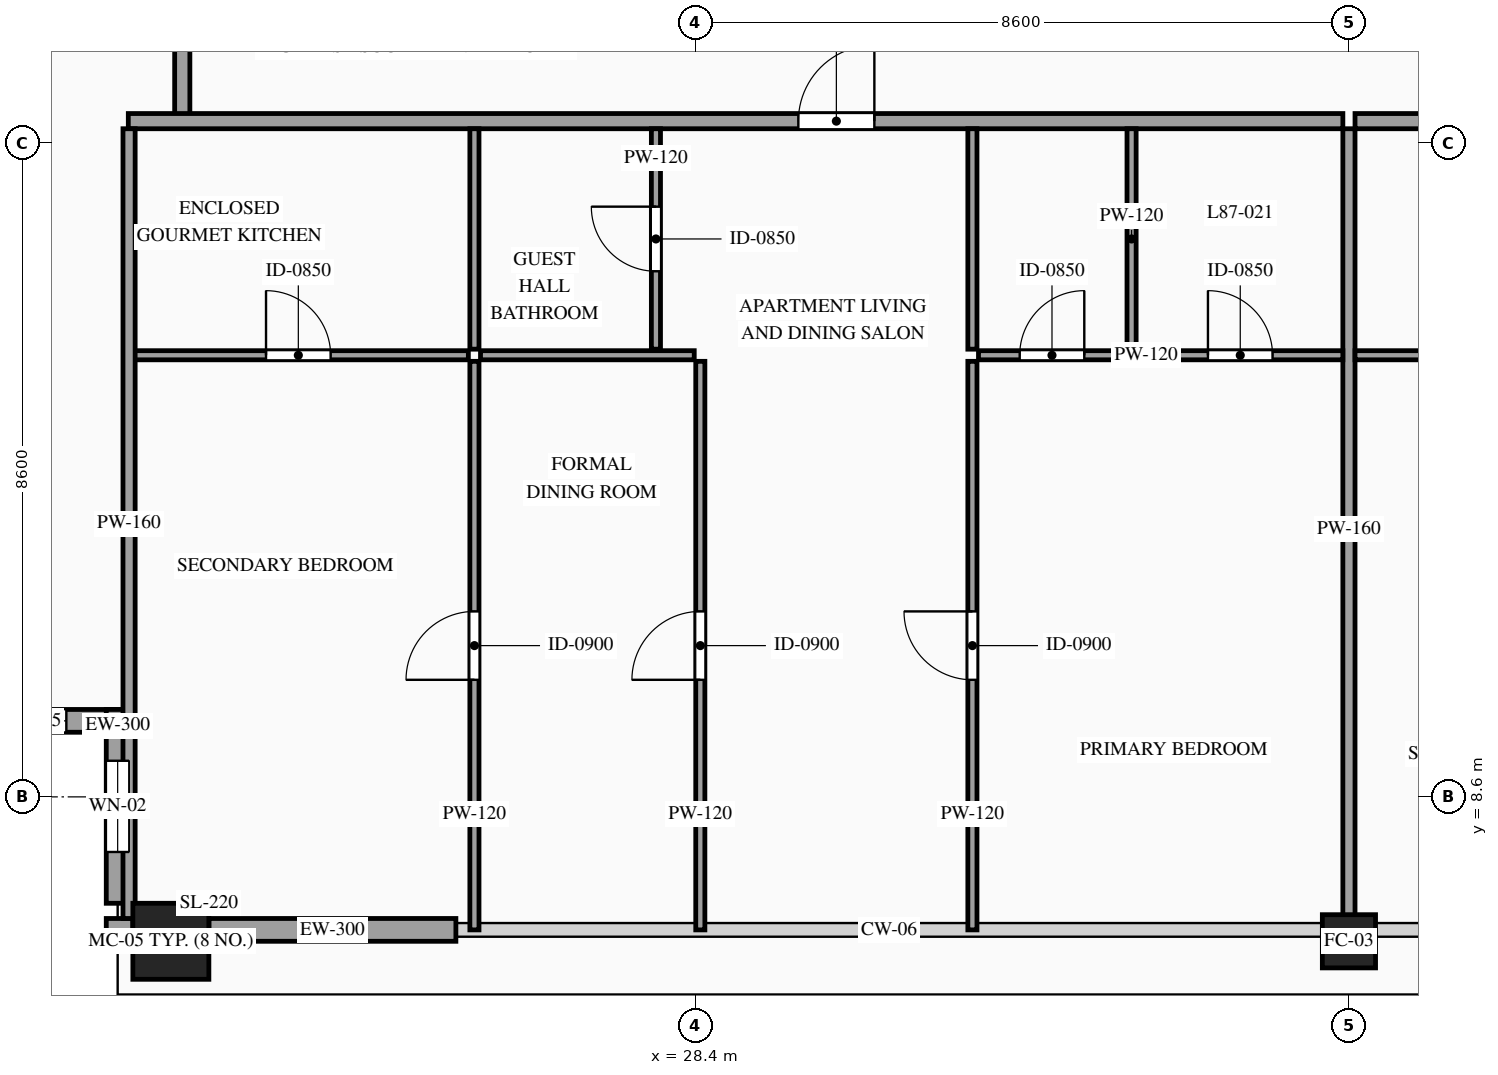
"""IFC4 building model, lengths in metres.
Left out: names, types, materials, properties, quantities, classifications, styles, units other than length and angle.
Written with IfcOpenShell. Run it as: python <this file> out.ifc"""

import sys

from ifc_helpers import new_model, si_unit, direction, frame, frame_2d, origin, origin_2d, place, context, subcontext, project, spatial, rectangle, hollow_rectangle, extrude, source, transform, mapped, element, fill, save


model = new_model("IFC4")
c1 = context("Model", 3, precision=1e-05, world=origin(), true_north=direction((0.0, 1.0)))
c2 = subcontext(c1, "Body", "Model", "MODEL_VIEW")
j1 = project(units=[si_unit("LENGTHUNIT", "METRE"), si_unit("PLANEANGLEUNIT", "RADIAN")], contexts=[c1])
p1 = place(None, origin())
s1 = spatial("IfcSite", under=j1, at=p1, CompositionType="ELEMENT")
p2 = place(p1, origin())
s2 = spatial("IfcBuilding", under=s1, at=p2, CompositionType="ELEMENT")
p3 = place(p2, frame((0.0, 0.0, 325.2)))
s3 = spatial("IfcBuildingStorey", under=s2, at=p3, CompositionType="ELEMENT", Elevation=325.2)
m1 = source(origin(), c2, "Body", "SweptSolid", [
    extrude(hollow_rectangle(XDim=1.0, YDim=1.0, WallThickness=0.048, at=origin_2d()), origin(), (0.0, 0.0, 1.0), 3.5),
])
p4 = place(p3, frame((21.5, 6.7, 0.0), z_axis=(0.0, 0.0, 1.0), x_axis=(1.0, 0.0, 0.0)))
e1 = element("IfcColumn", 1, at=p4, inside=s3, PredefinedType="COLUMN", context=c2, shape_type="MappedRepresentation", body=[
    mapped(m1, transform((0.0, 0.0, 0.0), scale=1.0)),
])
m2 = source(origin(), c2, "Body", "SweptSolid", [
    extrude(hollow_rectangle(XDim=0.7, YDim=0.7, WallThickness=0.032, at=origin_2d()), origin(), (0.0, 0.0, 1.0), 3.5),
])
p5 = place(p3, frame((37.0, 6.7, 0.0), z_axis=(0.0, 0.0, 1.0), x_axis=(1.0, 0.0, 0.0)))
e2 = element("IfcColumn", 2, at=p5, inside=s3, PredefinedType="COLUMN", context=c2, shape_type="MappedRepresentation", body=[
    mapped(m2, transform((0.0, 0.0, 0.0), scale=1.0)),
])
p6 = place(p3, frame((18.4, 9.6, 0.0), z_axis=(0.0, 0.0, 1.0), x_axis=(1.0, 0.0, 0.0)))
e3 = element("IfcWall", 3, at=p6, inside=s3, PredefinedType="SOLIDWALL", context=c2, shape_type="SweptSolid", body=[
    extrude(rectangle(XDim=2.55, YDim=0.3, at=frame_2d((1.275, 0.0))), origin(), (0.0, 0.0, 1.0), 3.28),
])
p7 = place(p6, frame((0.825, 0.0, 0.85)))
e4 = element("IfcOpeningElement", 4, at=p7, cuts=e3, PredefinedType="OPENING", context=c2, shape_type="SweptSolid", body=[
    extrude(rectangle(XDim=0.9, YDim=1.5, at=frame_2d((0.45, 0.75))), frame((0.0, 0.165, 0.0), z_axis=(0.0, -1.0, 0.0), x_axis=(1.0, 0.0, 0.0)), (0.0, 0.0, 1.0), 0.33),
])
p8 = place(p3, frame((20.8, 9.75, 0.0), z_axis=(0.0, 0.0, 1.0), x_axis=(0.0, -1.0, 0.0)))
e5 = element("IfcWall", 5, at=p8, inside=s3, PredefinedType="SOLIDWALL", context=c2, shape_type="SweptSolid", body=[
    extrude(rectangle(XDim=2.55, YDim=0.3, at=frame_2d((1.275, 0.0))), origin(), (0.0, 0.0, 1.0), 3.28),
])
p9 = place(p8, frame((0.675, 0.0, 0.85)))
e6 = element("IfcOpeningElement", 6, at=p9, cuts=e5, PredefinedType="OPENING", context=c2, shape_type="SweptSolid", body=[
    extrude(rectangle(XDim=1.2, YDim=2.1, at=frame_2d((0.6, 1.05))), frame((0.0, 0.165, 0.0), z_axis=(0.0, -1.0, 0.0), x_axis=(1.0, 0.0, 0.0)), (0.0, 0.0, 1.0), 0.33),
])
m3 = source(origin(), c2, "Body", "SweptSolid", [
    extrude(rectangle(XDim=0.35, YDim=0.3, at=frame_2d((0.175, 0.0))), origin(), (0.0, 0.0, 1.0), 3.28),
])
p10 = place(p3, frame((20.65, 6.85, 0.0), z_axis=(0.0, 0.0, 1.0), x_axis=(1.0, 0.0, 0.0)))
e7 = element("IfcWall", 7, at=p10, inside=s3, PredefinedType="SOLIDWALL", context=c2, shape_type="MappedRepresentation", body=[
    mapped(m3, transform((0.0, 0.0, 0.0), scale=1.0)),
])
m4 = source(origin(), c2, "Body", "SweptSolid", [
    extrude(rectangle(XDim=3.25, YDim=0.3, at=frame_2d((1.625, 0.0))), origin(), (0.0, 0.0, 1.0), 2.885),
])
p11 = place(p3, frame((22.0, 6.85, 0.0), z_axis=(0.0, 0.0, 1.0), x_axis=(1.0, 0.0, 0.0)))
e8 = element("IfcWall", 8, at=p11, inside=s3, PredefinedType="SOLIDWALL", context=c2, shape_type="MappedRepresentation", body=[
    mapped(m4, transform((0.0, 0.0, 0.0), scale=1.0)),
])
m5 = source(origin(), c2, "Body", "SweptSolid", [
    extrude(rectangle(XDim=1.7, YDim=0.2, at=frame_2d((0.85, 0.0))), origin(), (0.0, 0.0, 1.0), 3.28),
])
p12 = place(p3, frame((21.65, 17.55, 0.0), z_axis=(0.0, 0.0, 1.0), x_axis=(0.0, 1.0, 0.0)))
e9 = element("IfcWall", 9, at=p12, inside=s3, PredefinedType="PARTITIONING", context=c2, shape_type="MappedRepresentation", body=[
    mapped(m5, transform((0.0, 0.0, 0.0), scale=1.0)),
])
p13 = place(p3, frame((20.94, 17.49, 0.0), z_axis=(0.0, 0.0, 1.0), x_axis=(1.0, 0.0, 0.0)))
e10 = element("IfcWall", 10, at=p13, inside=s3, PredefinedType="PARTITIONING", context=c2, shape_type="SweptSolid", body=[
    extrude(rectangle(XDim=15.98, YDim=0.2, at=frame_2d((7.99, 0.0))), origin(), (0.0, 0.0, 1.0), 3.28),
])
p14 = place(p13, frame((8.816, 0.0, 0.0)))
e11 = element("IfcOpeningElement", 11, at=p14, cuts=e10, PredefinedType="OPENING", context=c2, shape_type="SweptSolid", body=[
    extrude(rectangle(XDim=1.0, YDim=2.2, at=frame_2d((0.5, 1.1))), frame((0.0, 0.115, 0.0), z_axis=(0.0, -1.0, 0.0), x_axis=(1.0, 0.0, 0.0)), (0.0, 0.0, 1.0), 0.23),
])
m6 = source(origin(), c2, "Body", "SweptSolid", [
    extrude(rectangle(XDim=10.54, YDim=0.16, at=frame_2d((5.27, 0.0))), origin(), (0.0, 0.0, 1.0), 2.787),
])
p15 = place(p3, frame((37.0, 6.85, 0.0), z_axis=(0.0, 0.0, 1.0), x_axis=(0.0, 1.0, 0.0)))
e12 = element("IfcWall", 12, at=p15, inside=s3, PredefinedType="PARTITIONING", context=c2, shape_type="MappedRepresentation", body=[
    mapped(m6, transform((0.0, 0.0, 0.0), scale=1.0)),
])
p16 = place(p3, frame((20.94, 14.41, 0.0), z_axis=(0.0, 0.0, 1.0), x_axis=(1.0, 0.0, 0.0)))
e13 = element("IfcWall", 13, at=p16, inside=s3, PredefinedType="PARTITIONING", context=c2, shape_type="SweptSolid", body=[
    extrude(rectangle(XDim=4.474, YDim=0.12, at=frame_2d((2.237, 0.0))), origin(), (0.0, 0.0, 1.0), 3.28),
])
p17 = place(p16, frame((1.812, 0.0, 0.0)))
e14 = element("IfcOpeningElement", 14, at=p17, cuts=e13, PredefinedType="OPENING", context=c2, shape_type="SweptSolid", body=[
    extrude(rectangle(XDim=0.85, YDim=2.1, at=frame_2d((0.425, 1.05))), frame((0.0, 0.075, 0.0), z_axis=(0.0, -1.0, 0.0), x_axis=(1.0, 0.0, 0.0)), (0.0, 0.0, 1.0), 0.15),
])
m7 = source(origin(), c2, "Body", "SweptSolid", [
    extrude(rectangle(XDim=2.9, YDim=0.12, at=frame_2d((1.45, 0.0))), origin(), (0.0, 0.0, 1.0), 3.28),
])
p18 = place(p3, frame((25.494, 14.49, 0.0), z_axis=(0.0, 0.0, 1.0), x_axis=(0.0, 1.0, 0.0)))
e15 = element("IfcWall", 15, at=p18, inside=s3, PredefinedType="PARTITIONING", context=c2, shape_type="MappedRepresentation", body=[
    mapped(m7, transform((0.0, 0.0, 0.0), scale=1.0)),
])
p19 = place(p3, frame((27.882, 14.49, 0.0), z_axis=(0.0, 0.0, 1.0), x_axis=(0.0, 1.0, 0.0)))
e16 = element("IfcWall", 16, at=p19, inside=s3, PredefinedType="PARTITIONING", context=c2, shape_type="SweptSolid", body=[
    extrude(rectangle(XDim=2.9, YDim=0.12, at=frame_2d((1.45, 0.0))), origin(), (0.0, 0.0, 1.0), 3.28),
])
p20 = place(p19, frame((1.025, 0.0, 0.0)))
e17 = element("IfcOpeningElement", 17, at=p20, cuts=e16, PredefinedType="OPENING", context=c2, shape_type="SweptSolid", body=[
    extrude(rectangle(XDim=0.85, YDim=2.1, at=frame_2d((0.425, 1.05))), frame((0.0, 0.075, 0.0), z_axis=(0.0, -1.0, 0.0), x_axis=(1.0, 0.0, 0.0)), (0.0, 0.0, 1.0), 0.15),
])
for number, where, z_axis, x_axis in (
    (18, (34.14, 14.49, 0.0), (0.0, 0.0, 1.0), (0.0, 1.0, 0.0)),
    (19, (32.046, 14.49, 0.0), (0.0, 0.0, 1.0), (0.0, 1.0, 0.0)),
):
    element("IfcWall", number, at=place(p3, frame(where, z_axis=z_axis, x_axis=x_axis)), inside=s3, PredefinedType="PARTITIONING", context=c2, shape_type="MappedRepresentation", body=[
        mapped(m7, transform((0.0, 0.0, 0.0), scale=1.0)),
    ])
p21 = place(p3, frame((25.494, 6.85, 0.0), z_axis=(0.0, 0.0, 1.0), x_axis=(0.0, 1.0, 0.0)))
e20 = element("IfcWall", 20, at=p21, inside=s3, PredefinedType="PARTITIONING", context=c2, shape_type="SweptSolid", body=[
    extrude(rectangle(XDim=7.48, YDim=0.12, at=frame_2d((3.74, 0.0))), origin(), (0.0, 0.0, 1.0), 3.28),
])
p22 = place(p21, frame((3.29, 0.0, 0.0)))
e21 = element("IfcOpeningElement", 21, at=p22, cuts=e20, PredefinedType="OPENING", context=c2, shape_type="SweptSolid", body=[
    extrude(rectangle(XDim=0.9, YDim=2.15, at=frame_2d((0.45, 1.075))), frame((0.0, 0.075, 0.0), z_axis=(0.0, -1.0, 0.0), x_axis=(1.0, 0.0, 0.0)), (0.0, 0.0, 1.0), 0.15),
])
p23 = place(p3, frame((32.126, 14.41, 0.0), z_axis=(0.0, 0.0, 1.0), x_axis=(1.0, 0.0, 0.0)))
e22 = element("IfcWall", 22, at=p23, inside=s3, PredefinedType="PARTITIONING", context=c2, shape_type="SweptSolid", body=[
    extrude(rectangle(XDim=4.794, YDim=0.12, at=frame_2d((2.397, 0.0))), origin(), (0.0, 0.0, 1.0), 3.28),
])
p24 = place(p23, frame((3.019, 0.0, 0.0)))
e23 = element("IfcOpeningElement", 23, at=p24, cuts=e22, PredefinedType="OPENING", context=c2, shape_type="SweptSolid", body=[
    extrude(rectangle(XDim=0.85, YDim=2.1, at=frame_2d((0.425, 1.05))), frame((0.0, 0.075, 0.0), z_axis=(0.0, -1.0, 0.0), x_axis=(1.0, 0.0, 0.0)), (0.0, 0.0, 1.0), 0.15),
])
p25 = place(p23, frame((0.542, 0.0, 0.0)))
e24 = element("IfcOpeningElement", 24, at=p25, cuts=e22, PredefinedType="OPENING", context=c2, shape_type="SweptSolid", body=[
    extrude(rectangle(XDim=0.85, YDim=2.1, at=frame_2d((0.425, 1.05))), frame((0.0, 0.075, 0.0), z_axis=(0.0, -1.0, 0.0), x_axis=(1.0, 0.0, 0.0)), (0.0, 0.0, 1.0), 0.15),
])
p26 = place(p3, frame((32.046, 6.85, 0.0), z_axis=(0.0, 0.0, 1.0), x_axis=(0.0, 1.0, 0.0)))
e25 = element("IfcWall", 25, at=p26, inside=s3, PredefinedType="PARTITIONING", context=c2, shape_type="SweptSolid", body=[
    extrude(rectangle(XDim=7.48, YDim=0.12, at=frame_2d((3.74, 0.0))), origin(), (0.0, 0.0, 1.0), 3.28),
])
p27 = place(p26, frame((3.29, 0.0, 0.0)))
e26 = element("IfcOpeningElement", 26, at=p27, cuts=e25, PredefinedType="OPENING", context=c2, shape_type="SweptSolid", body=[
    extrude(rectangle(XDim=0.9, YDim=2.15, at=frame_2d((0.45, 1.075))), frame((0.0, 0.075, 0.0), z_axis=(0.0, -1.0, 0.0), x_axis=(1.0, 0.0, 0.0)), (0.0, 0.0, 1.0), 0.15),
])
m8 = source(origin(), c2, "Body", "SweptSolid", [
    extrude(rectangle(XDim=2.812, YDim=0.12, at=frame_2d((1.406, 0.0))), origin(), (0.0, 0.0, 1.0), 3.28),
])
p28 = place(p3, frame((25.574, 14.41, 0.0), z_axis=(0.0, 0.0, 1.0), x_axis=(1.0, 0.0, 0.0)))
e27 = element("IfcWall", 27, at=p28, inside=s3, PredefinedType="PARTITIONING", context=c2, shape_type="MappedRepresentation", body=[
    mapped(m8, transform((0.0, 0.0, 0.0), scale=1.0)),
])
p29 = place(p3, frame((28.466, 6.85, 0.0), z_axis=(0.0, 0.0, 1.0), x_axis=(0.0, 1.0, 0.0)))
e28 = element("IfcWall", 28, at=p29, inside=s3, PredefinedType="PARTITIONING", context=c2, shape_type="SweptSolid", body=[
    extrude(rectangle(XDim=7.48, YDim=0.12, at=frame_2d((3.74, 0.0))), origin(), (0.0, 0.0, 1.0), 3.28),
])
p30 = place(p29, frame((3.29, 0.0, 0.0)))
e29 = element("IfcOpeningElement", 29, at=p30, cuts=e28, PredefinedType="OPENING", context=c2, shape_type="SweptSolid", body=[
    extrude(rectangle(XDim=0.9, YDim=2.15, at=frame_2d((0.45, 1.075))), frame((0.0, 0.075, 0.0), z_axis=(0.0, -1.0, 0.0), x_axis=(1.0, 0.0, 0.0)), (0.0, 0.0, 1.0), 0.15),
])
p31 = place(p3, frame((37.08, 17.49, 0.0), z_axis=(0.0, 0.0, 1.0), x_axis=(1.0, 0.0, 0.0)))
e30 = element("IfcWall", 30, at=p31, inside=s3, PredefinedType="PARTITIONING", context=c2, shape_type="SweptSolid", body=[
    extrude(rectangle(XDim=15.98, YDim=0.2, at=frame_2d((7.99, 0.0))), origin(), (0.0, 0.0, 1.0), 3.28),
])
p32 = place(p31, frame((8.816, 0.0, 0.0)))
e31 = element("IfcOpeningElement", 31, at=p32, cuts=e30, PredefinedType="OPENING", context=c2, shape_type="SweptSolid", body=[
    extrude(rectangle(XDim=1.0, YDim=2.2, at=frame_2d((0.5, 1.1))), frame((0.0, 0.115, 0.0), z_axis=(0.0, -1.0, 0.0), x_axis=(1.0, 0.0, 0.0)), (0.0, 0.0, 1.0), 0.23),
])
m9 = source(origin(), c2, "Body", "SweptSolid", [
    extrude(rectangle(XDim=10.39, YDim=0.16, at=frame_2d((5.195, 0.0))), origin(), (0.0, 0.0, 1.0), 3.28),
])
p33 = place(p3, frame((20.95, 7.0, 0.0), z_axis=(0.0, 0.0, 1.0), x_axis=(0.0, 1.0, 0.0)))
e32 = element("IfcWall", 32, at=p33, inside=s3, PredefinedType="PARTITIONING", context=c2, shape_type="MappedRepresentation", body=[
    mapped(m9, transform((0.0, 0.0, 0.0), scale=1.0)),
])
p34 = place(p3, frame((37.08, 14.41, 0.0), z_axis=(0.0, 0.0, 1.0), x_axis=(1.0, 0.0, 0.0)))
e33 = element("IfcWall", 33, at=p34, inside=s3, PredefinedType="PARTITIONING", context=c2, shape_type="SweptSolid", body=[
    extrude(rectangle(XDim=4.474, YDim=0.12, at=frame_2d((2.237, 0.0))), origin(), (0.0, 0.0, 1.0), 3.28),
])
p35 = place(p34, frame((1.812, 0.0, 0.0)))
e34 = element("IfcOpeningElement", 34, at=p35, cuts=e33, PredefinedType="OPENING", context=c2, shape_type="SweptSolid", body=[
    extrude(rectangle(XDim=0.85, YDim=2.1, at=frame_2d((0.425, 1.05))), frame((0.0, 0.075, 0.0), z_axis=(0.0, -1.0, 0.0), x_axis=(1.0, 0.0, 0.0)), (0.0, 0.0, 1.0), 0.15),
])
m10 = source(origin(), c2, "Body", "SweptSolid", [
    extrude(rectangle(XDim=0.9, YDim=1.5, at=frame_2d((0.45, 0.75))), frame((0.0, 0.03, 0.0), z_axis=(0.0, -1.0, 0.0), x_axis=(1.0, 0.0, 0.0)), (0.0, 0.0, 1.0), 0.06),
])
p36 = place(p7, origin())
e35 = element("IfcWindow", 35, at=p36, inside=s3, PartitioningType="SINGLE_PANEL", PredefinedType="WINDOW", context=c2, shape_type="MappedRepresentation", body=[
    mapped(m10, transform((0.0, 0.0, 0.0), scale=1.0)),
])
fill(e4, e35)
m11 = source(origin(), c2, "Body", "SweptSolid", [
    extrude(rectangle(XDim=1.2, YDim=2.1, at=frame_2d((0.6, 1.05))), frame((0.0, 0.03, 0.0), z_axis=(0.0, -1.0, 0.0), x_axis=(1.0, 0.0, 0.0)), (0.0, 0.0, 1.0), 0.06),
])
p37 = place(p9, origin())
e36 = element("IfcWindow", 36, at=p37, inside=s3, PartitioningType="SINGLE_PANEL", PredefinedType="WINDOW", context=c2, shape_type="MappedRepresentation", body=[
    mapped(m11, transform((0.0, 0.0, 0.0), scale=1.0)),
])
fill(e6, e36)
m12 = source(origin(), c2, "Body", "SweptSolid", [
    extrude(rectangle(XDim=1.0, YDim=2.2, at=frame_2d((0.5, 1.1))), frame((0.0, 0.025, 0.0), z_axis=(0.0, -1.0, 0.0), x_axis=(1.0, 0.0, 0.0)), (0.0, 0.0, 1.0), 0.05),
])
p38 = place(p14, origin())
e37 = element("IfcDoor", 37, at=p38, inside=s3, OperationType="SINGLE_SWING_RIGHT", PredefinedType="DOOR", context=c2, shape_type="MappedRepresentation", body=[
    mapped(m12, transform((0.0, 0.0, 0.0), scale=1.0)),
])
fill(e11, e37)
m13 = source(origin(), c2, "Body", "SweptSolid", [
    extrude(rectangle(XDim=0.85, YDim=2.1, at=frame_2d((0.425, 1.05))), frame((0.0, 0.025, 0.0), z_axis=(0.0, -1.0, 0.0), x_axis=(1.0, 0.0, 0.0)), (0.0, 0.0, 1.0), 0.05),
])
p39 = place(p17, origin())
e38 = element("IfcDoor", 38, at=p39, inside=s3, OperationType="SINGLE_SWING_LEFT", PredefinedType="DOOR", context=c2, shape_type="MappedRepresentation", body=[
    mapped(m13, transform((0.0, 0.0, 0.0), scale=1.0)),
])
fill(e14, e38)
p40 = place(p20, origin())
e39 = element("IfcDoor", 39, at=p40, inside=s3, OperationType="SINGLE_SWING_RIGHT", PredefinedType="DOOR", context=c2, shape_type="MappedRepresentation", body=[
    mapped(m13, transform((0.0, 0.0, 0.0), scale=1.0)),
])
fill(e17, e39)
p41 = place(p24, origin())
e40 = element("IfcDoor", 40, at=p41, inside=s3, OperationType="SINGLE_SWING_LEFT", PredefinedType="DOOR", context=c2, shape_type="MappedRepresentation", body=[
    mapped(m13, transform((0.0, 0.0, 0.0), scale=1.0)),
])
fill(e23, e40)
p42 = place(p25, origin())
e41 = element("IfcDoor", 41, at=p42, inside=s3, OperationType="SINGLE_SWING_RIGHT", PredefinedType="DOOR", context=c2, shape_type="MappedRepresentation", body=[
    mapped(m13, transform((0.0, 0.0, 0.0), scale=1.0)),
])
fill(e24, e41)
m14 = source(origin(), c2, "Body", "SweptSolid", [
    extrude(rectangle(XDim=0.9, YDim=2.15, at=frame_2d((0.45, 1.075))), frame((0.0, 0.025, 0.0), z_axis=(0.0, -1.0, 0.0), x_axis=(1.0, 0.0, 0.0)), (0.0, 0.0, 1.0), 0.05),
])
p43 = place(p22, origin())
e42 = element("IfcDoor", 42, at=p43, inside=s3, OperationType="SINGLE_SWING_LEFT", PredefinedType="DOOR", context=c2, shape_type="MappedRepresentation", body=[
    mapped(m14, transform((0.0, 0.0, 0.0), scale=1.0)),
])
fill(e21, e42)
p44 = place(p27, origin())
e43 = element("IfcDoor", 43, at=p44, inside=s3, OperationType="SINGLE_SWING_RIGHT", PredefinedType="DOOR", context=c2, shape_type="MappedRepresentation", body=[
    mapped(m14, transform((0.0, 0.0, 0.0), scale=1.0)),
])
fill(e26, e43)
p45 = place(p30, origin())
e44 = element("IfcDoor", 44, at=p45, inside=s3, OperationType="SINGLE_SWING_LEFT", PredefinedType="DOOR", context=c2, shape_type="MappedRepresentation", body=[
    mapped(m14, transform((0.0, 0.0, 0.0), scale=1.0)),
])
fill(e29, e44)
save(model, sys.argv[1])
